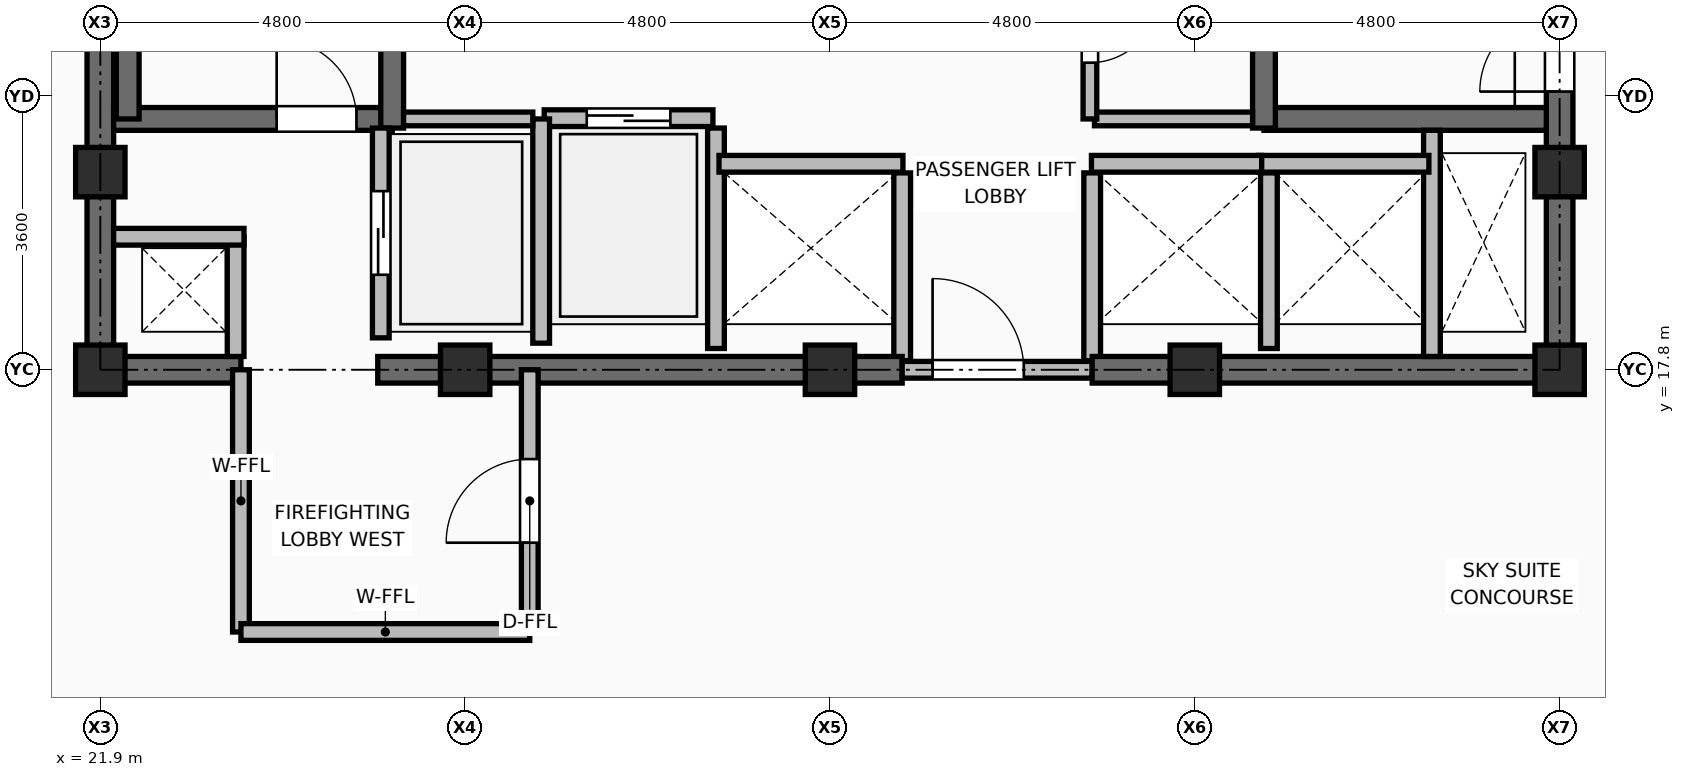
"""IFC4 building model, lengths in metres.
Left out: names, types, materials, properties, quantities, classifications, styles, units other than length and angle.
Written with IfcOpenShell. Run it as: python <this file> out.ifc"""

import sys

from ifc_helpers import new_model, si_unit, direction, frame, frame_2d, origin, origin_2d, place, context, subcontext, project, spatial, rectangle, extrude, element, fill, save


model = new_model("IFC4")
c1 = context("Model", 3, precision=1e-05, world=origin(), true_north=direction((0.0, 1.0)))
c2 = subcontext(c1, "Body", "Model", "MODEL_VIEW")
j1 = project(units=[si_unit("LENGTHUNIT", "METRE"), si_unit("PLANEANGLEUNIT", "RADIAN")], contexts=[c1])
p1 = place(None, origin())
s1 = spatial("IfcSite", under=j1, at=p1, CompositionType="ELEMENT")
p2 = place(p1, origin())
s2 = spatial("IfcBuilding", under=s1, at=p2, CompositionType="ELEMENT")
p3 = place(p2, frame((0.0, 0.0, 278.85)))
s3 = spatial("IfcBuildingStorey", under=s2, at=p3, CompositionType="ELEMENT", Elevation=278.85)
for number, where, z_axis, x_axis in (
    (1, (21.9, 17.8, 0.0), (0.0, 0.0, 1.0), (1.0, 0.0, 0.0)),
    (2, (26.7, 17.8, 0.0), (0.0, 0.0, 1.0), (1.0, 0.0, 0.0)),
    (3, (31.5, 17.8, 0.0), (0.0, 0.0, 1.0), (1.0, 0.0, 0.0)),
    (4, (36.3, 17.8, 0.0), (0.0, 0.0, 1.0), (1.0, 0.0, 0.0)),
    (5, (41.1, 17.8, 0.0), (0.0, 0.0, 1.0), (1.0, 0.0, 0.0)),
    (6, (21.9, 20.4, 0.0), (0.0, 0.0, 1.0), (1.0, 0.0, 0.0)),
    (7, (41.1, 20.4, 0.0), (0.0, 0.0, 1.0), (1.0, 0.0, 0.0)),
):
    element("IfcColumn", number, at=place(p3, frame(where, z_axis=z_axis, x_axis=x_axis)), inside=s3, PredefinedType="COLUMN", context=c2, shape_type="SweptSolid", body=[
        extrude(rectangle(XDim=0.65, YDim=0.65, at=origin_2d()), origin(), (0.0, 0.0, 1.0), 3.75),
    ])
p4 = place(p3, frame((30.0, 18.08, 0.0), z_axis=(0.0, 0.0, 1.0), x_axis=(0.0, 1.0, 0.0)))
e8 = element("IfcWall", 8, at=p4, inside=s3, PredefinedType="PARTITIONING", context=c2, shape_type="SweptSolid", body=[
    extrude(rectangle(XDim=2.9, YDim=0.22, at=frame_2d((1.45, 0.0))), origin(), (0.0, 0.0, 1.0), 3.545),
])
for number, where, z_axis, x_axis in (
    (9, (32.45, 17.92, 0.0), (0.0, 0.0, 1.0), (0.0, 1.0, 0.0)),
    (10, (34.95, 17.92, 0.0), (0.0, 0.0, 1.0), (0.0, 1.0, 0.0)),
):
    element("IfcWall", number, at=place(p3, frame(where, z_axis=z_axis, x_axis=x_axis)), inside=s3, PredefinedType="PARTITIONING", context=c2, shape_type="SweptSolid", body=[
        extrude(rectangle(XDim=2.47, YDim=0.22, at=frame_2d((1.235, 0.0))), origin(), (0.0, 0.0, 1.0), 3.545),
    ])
p5 = place(p3, frame((37.275, 18.08, 0.0), z_axis=(0.0, 0.0, 1.0), x_axis=(0.0, 1.0, 0.0)))
e11 = element("IfcWall", 11, at=p5, inside=s3, PredefinedType="PARTITIONING", context=c2, shape_type="SweptSolid", body=[
    extrude(rectangle(XDim=2.31, YDim=0.22, at=frame_2d((1.155, 0.0))), origin(), (0.0, 0.0, 1.0), 3.545),
])
p6 = place(p3, frame((21.725, 17.8, 0.0), z_axis=(0.0, 0.0, 1.0), x_axis=(1.0, 0.0, 0.0)))
e12 = element("IfcWall", 12, at=p6, inside=s3, PredefinedType="SHEAR", context=c2, shape_type="SweptSolid", body=[
    extrude(rectangle(XDim=2.025, YDim=0.35, at=frame_2d((1.012, 0.0))), origin(), (0.0, 0.0, 1.0), 3.57),
])
p7 = place(p3, frame((25.55, 17.8, 0.0), z_axis=(0.0, 0.0, 1.0), x_axis=(1.0, 0.0, 0.0)))
e13 = element("IfcWall", 13, at=p7, inside=s3, PredefinedType="SHEAR", context=c2, shape_type="SweptSolid", body=[
    extrude(rectangle(XDim=6.9, YDim=0.35, at=frame_2d((3.45, 0.0))), origin(), (0.0, 0.0, 1.0), 3.57),
])
p8 = place(p3, frame((32.45, 17.8, 0.0), z_axis=(0.0, 0.0, 1.0), x_axis=(1.0, 0.0, 0.0)))
e14 = element("IfcWall", 14, at=p8, inside=s3, PredefinedType="PARTITIONING", context=c2, shape_type="SweptSolid", body=[
    extrude(rectangle(XDim=2.5, YDim=0.22, at=frame_2d((1.25, 0.0))), origin(), (0.0, 0.0, 1.0), 3.132),
])
p9 = place(p8, frame((0.4, 0.0, 0.0)))
e15 = element("IfcOpeningElement", 15, at=p9, cuts=e14, PredefinedType="OPENING", context=c2, shape_type="SweptSolid", body=[
    extrude(rectangle(XDim=1.2, YDim=2.1, at=frame_2d((0.6, 1.05))), frame((0.0, 0.12, 0.0), z_axis=(0.0, -1.0, 0.0), x_axis=(1.0, 0.0, 0.0)), (0.0, 0.0, 1.0), 0.24),
])
p10 = place(p3, frame((34.95, 17.8, 0.0), z_axis=(0.0, 0.0, 1.0), x_axis=(1.0, 0.0, 0.0)))
e16 = element("IfcWall", 16, at=p10, inside=s3, PredefinedType="SHEAR", context=c2, shape_type="SweptSolid", body=[
    extrude(rectangle(XDim=6.325, YDim=0.35, at=frame_2d((3.163, 0.0))), origin(), (0.0, 0.0, 1.0), 3.57),
])
p11 = place(p3, frame((21.9, 17.975, 0.0), z_axis=(0.0, 0.0, 1.0), x_axis=(0.0, 1.0, 0.0)))
e17 = element("IfcWall", 17, at=p11, inside=s3, PredefinedType="SHEAR", context=c2, shape_type="SweptSolid", body=[
    extrude(rectangle(XDim=14.3, YDim=0.35, at=frame_2d((7.15, 0.0))), origin(), (0.0, 0.0, 1.0), 3.57),
])
p12 = place(p3, frame((41.1, 17.975, 0.0), z_axis=(0.0, 0.0, 1.0), x_axis=(0.0, 1.0, 0.0)))
e18 = element("IfcWall", 18, at=p12, inside=s3, PredefinedType="SHEAR", context=c2, shape_type="SweptSolid", body=[
    extrude(rectangle(XDim=14.3, YDim=0.35, at=frame_2d((7.15, 0.0))), origin(), (0.0, 0.0, 1.0), 3.57),
])
p13 = place(p12, frame((3.485, 0.0, 0.0)))
e19 = element("IfcOpeningElement", 19, at=p13, cuts=e18, PredefinedType="OPENING", context=c2, shape_type="SweptSolid", body=[
    extrude(rectangle(XDim=1.05, YDim=2.1, at=frame_2d((0.525, 1.05))), frame((0.0, 0.185, 0.0), z_axis=(0.0, -1.0, 0.0), x_axis=(1.0, 0.0, 0.0)), (0.0, 0.0, 1.0), 0.37),
])
p14 = place(p3, frame((22.075, 21.1, 0.0), z_axis=(0.0, 0.0, 1.0), x_axis=(1.0, 0.0, 0.0)))
e20 = element("IfcWall", 20, at=p14, inside=s3, PredefinedType="SHEAR", context=c2, shape_type="SweptSolid", body=[
    extrude(rectangle(XDim=3.665, YDim=0.3, at=frame_2d((1.833, 0.0))), origin(), (0.0, 0.0, 1.0), 3.57),
])
p15 = place(p14, frame((2.145, 0.0, 0.0)))
e21 = element("IfcOpeningElement", 21, at=p15, cuts=e20, PredefinedType="OPENING", context=c2, shape_type="SweptSolid", body=[
    extrude(rectangle(XDim=1.05, YDim=2.1, at=frame_2d((0.525, 1.05))), frame((0.0, 0.16, 0.0), z_axis=(0.0, -1.0, 0.0), x_axis=(1.0, 0.0, 0.0)), (0.0, 0.0, 1.0), 0.32),
])
p16 = place(p3, frame((25.74, 20.98, 0.0), z_axis=(0.0, 0.0, 1.0), x_axis=(0.0, 1.0, 0.0)))
e22 = element("IfcWall", 22, at=p16, inside=s3, PredefinedType="SHEAR", context=c2, shape_type="SweptSolid", body=[
    extrude(rectangle(XDim=7.99, YDim=0.3, at=frame_2d((3.995, 0.0))), origin(), (0.0, 0.0, 1.0), 3.57),
])
p17 = place(p3, frame((22.26, 21.1, 0.0), z_axis=(0.0, 0.0, 1.0), x_axis=(0.0, 1.0, 0.0)))
e23 = element("IfcWall", 23, at=p17, inside=s3, PredefinedType="SHEAR", context=c2, shape_type="SweptSolid", body=[
    extrude(rectangle(XDim=7.75, YDim=0.3, at=frame_2d((3.875, 0.0))), origin(), (0.0, 0.0, 1.0), 3.57),
])
p18 = place(p3, frame((37.21, 21.1, 0.0), z_axis=(0.0, 0.0, 1.0), x_axis=(1.0, 0.0, 0.0)))
e24 = element("IfcWall", 24, at=p18, inside=s3, PredefinedType="SHEAR", context=c2, shape_type="SweptSolid", body=[
    extrude(rectangle(XDim=3.715, YDim=0.3, at=frame_2d((1.857, 0.0))), origin(), (0.0, 0.0, 1.0), 3.57),
])
p19 = place(p3, frame((37.21, 20.98, 0.0), z_axis=(0.0, 0.0, 1.0), x_axis=(0.0, 1.0, 0.0)))
e25 = element("IfcWall", 25, at=p19, inside=s3, PredefinedType="SHEAR", context=c2, shape_type="SweptSolid", body=[
    extrude(rectangle(XDim=7.99, YDim=0.3, at=frame_2d((3.995, 0.0))), origin(), (0.0, 0.0, 1.0), 3.57),
])
p20 = place(p3, frame((23.68, 17.975, 0.0), z_axis=(0.0, 0.0, 1.0), x_axis=(0.0, 1.0, 0.0)))
e26 = element("IfcWall", 26, at=p20, inside=s3, PredefinedType="PARTITIONING", context=c2, shape_type="SweptSolid", body=[
    extrude(rectangle(XDim=1.575, YDim=0.22, at=frame_2d((0.788, 0.0))), origin(), (0.0, 0.0, 1.0), 3.132),
])
p21 = place(p3, frame((22.075, 19.55, 0.0), z_axis=(0.0, 0.0, 1.0), x_axis=(1.0, 0.0, 0.0)))
e27 = element("IfcWall", 27, at=p21, inside=s3, PredefinedType="PARTITIONING", context=c2, shape_type="SweptSolid", body=[
    extrude(rectangle(XDim=1.715, YDim=0.22, at=frame_2d((0.857, 0.0))), origin(), (0.0, 0.0, 1.0), 2.595),
])
p22 = place(p3, frame((39.42, 17.975, 0.0), z_axis=(0.0, 0.0, 1.0), x_axis=(0.0, 1.0, 0.0)))
e28 = element("IfcWall", 28, at=p22, inside=s3, PredefinedType="PARTITIONING", context=c2, shape_type="SweptSolid", body=[
    extrude(rectangle(XDim=2.975, YDim=0.22, at=frame_2d((1.487, 0.0))), origin(), (0.0, 0.0, 1.0), 3.132),
])
p23 = place(p3, frame((25.59, 18.22, 0.0), z_axis=(0.0, 0.0, 1.0), x_axis=(0.0, 1.0, 0.0)))
e29 = element("IfcWall", 29, at=p23, inside=s3, PredefinedType="PARTITIONING", context=c2, shape_type="SweptSolid", body=[
    extrude(rectangle(XDim=2.76, YDim=0.22, at=frame_2d((1.38, 0.0))), origin(), (0.0, 0.0, 1.0), 3.55),
])
p24 = place(p23, frame((0.83, 0.0, 0.0)))
e30 = element("IfcOpeningElement", 30, at=p24, cuts=e29, PredefinedType="OPENING", context=c2, shape_type="SweptSolid", body=[
    extrude(rectangle(XDim=1.1, YDim=2.2, at=frame_2d((0.55, 1.1))), frame((0.0, 0.12, 0.0), z_axis=(0.0, -1.0, 0.0), x_axis=(1.0, 0.0, 0.0)), (0.0, 0.0, 1.0), 0.24),
])
p25 = place(p3, frame((27.74, 21.11, 0.0), z_axis=(0.0, 0.0, 1.0), x_axis=(1.0, 0.0, 0.0)))
e31 = element("IfcWall", 31, at=p25, inside=s3, PredefinedType="PARTITIONING", context=c2, shape_type="SweptSolid", body=[
    extrude(rectangle(XDim=2.22, YDim=0.22, at=frame_2d((1.11, 0.0))), origin(), (0.0, 0.0, 1.0), 3.55),
])
p26 = place(p25, frame((0.56, 0.0, 0.0)))
e32 = element("IfcOpeningElement", 32, at=p26, cuts=e31, PredefinedType="OPENING", context=c2, shape_type="SweptSolid", body=[
    extrude(rectangle(XDim=1.1, YDim=2.2, at=frame_2d((0.55, 1.1))), frame((0.0, 0.12, 0.0), z_axis=(0.0, -1.0, 0.0), x_axis=(1.0, 0.0, 0.0)), (0.0, 0.0, 1.0), 0.24),
])
p27 = place(p3, frame((30.04, 20.51, 0.0), z_axis=(0.0, 0.0, 1.0), x_axis=(1.0, 0.0, 0.0)))
e33 = element("IfcWall", 33, at=p27, inside=s3, PredefinedType="PARTITIONING", context=c2, shape_type="SweptSolid", body=[
    extrude(rectangle(XDim=2.42, YDim=0.22, at=frame_2d((1.21, 0.0))), origin(), (0.0, 0.0, 1.0), 3.55),
])
for number, where, z_axis, x_axis in (
    (34, (37.14, 20.51, 0.0), (0.0, 0.0, 1.0), (1.0, 0.0, 0.0)),
    (35, (34.94, 20.51, 0.0), (0.0, 0.0, 1.0), (1.0, 0.0, 0.0)),
):
    element("IfcWall", number, at=place(p3, frame(where, z_axis=z_axis, x_axis=x_axis)), inside=s3, PredefinedType="PARTITIONING", context=c2, shape_type="SweptSolid", body=[
        extrude(rectangle(XDim=2.24, YDim=0.22, at=frame_2d((1.12, 0.0))), origin(), (0.0, 0.0, 1.0), 3.55),
    ])
p28 = place(p3, frame((27.7, 18.15, 0.0), z_axis=(0.0, 0.0, 1.0), x_axis=(0.0, 1.0, 0.0)))
e36 = element("IfcWall", 36, at=p28, inside=s3, PredefinedType="PARTITIONING", context=c2, shape_type="SweptSolid", body=[
    extrude(rectangle(XDim=2.95, YDim=0.22, at=frame_2d((1.475, 0.0))), origin(), (0.0, 0.0, 1.0), 3.55),
])
p29 = place(p3, frame((25.89, 21.1, 0.0), z_axis=(0.0, 0.0, 1.0), x_axis=(1.0, 0.0, 0.0)))
e37 = element("IfcWall", 37, at=p29, inside=s3, PredefinedType="PARTITIONING", context=c2, shape_type="SweptSolid", body=[
    extrude(rectangle(XDim=1.7, YDim=0.18, at=frame_2d((0.85, 0.0))), origin(), (0.0, 0.0, 1.0), 3.55),
])
p30 = place(p3, frame((34.98, 21.1, 0.0), z_axis=(0.0, 0.0, 1.0), x_axis=(1.0, 0.0, 0.0)))
e38 = element("IfcWall", 38, at=p30, inside=s3, PredefinedType="PARTITIONING", context=c2, shape_type="SweptSolid", body=[
    extrude(rectangle(XDim=2.08, YDim=0.18, at=frame_2d((1.04, 0.0))), origin(), (0.0, 0.0, 1.0), 3.55),
])
p31 = place(p3, frame((34.92, 21.1, 0.0), z_axis=(0.0, 0.0, 1.0), x_axis=(0.0, 1.0, 0.0)))
e39 = element("IfcWall", 39, at=p31, inside=s3, PredefinedType="PARTITIONING", context=c2, shape_type="SweptSolid", body=[
    extrude(rectangle(XDim=2.38, YDim=0.18, at=frame_2d((1.19, 0.0))), origin(), (0.0, 0.0, 1.0), 3.55),
])
p32 = place(p31, frame((0.74, 0.0, 0.0)))
e40 = element("IfcOpeningElement", 40, at=p32, cuts=e39, PredefinedType="OPENING", context=c2, shape_type="SweptSolid", body=[
    extrude(rectangle(XDim=0.9, YDim=2.1, at=frame_2d((0.45, 1.05))), frame((0.0, 0.1, 0.0), z_axis=(0.0, -1.0, 0.0), x_axis=(1.0, 0.0, 0.0)), (0.0, 0.0, 1.0), 0.2),
])
p33 = place(p3, frame((23.75, 14.35, 0.0), z_axis=(0.0, 0.0, 1.0), x_axis=(0.0, 1.0, 0.0)))
e41 = element("IfcWall", 41, at=p33, inside=s3, PredefinedType="PARTITIONING", context=c2, shape_type="SweptSolid", body=[
    extrude(rectangle(XDim=3.45, YDim=0.22, at=frame_2d((1.725, 0.0))), origin(), (0.0, 0.0, 1.0), 3.132),
])
p34 = place(p3, frame((23.75, 14.35, 0.0), z_axis=(0.0, 0.0, 1.0), x_axis=(1.0, 0.0, 0.0)))
e42 = element("IfcWall", 42, at=p34, inside=s3, PredefinedType="PARTITIONING", context=c2, shape_type="SweptSolid", body=[
    extrude(rectangle(XDim=3.8, YDim=0.22, at=frame_2d((1.9, 0.0))), origin(), (0.0, 0.0, 1.0), 3.55),
])
p35 = place(p3, frame((27.55, 14.35, 0.0), z_axis=(0.0, 0.0, 1.0), x_axis=(0.0, 1.0, 0.0)))
e43 = element("IfcWall", 43, at=p35, inside=s3, PredefinedType="PARTITIONING", context=c2, shape_type="SweptSolid", body=[
    extrude(rectangle(XDim=3.45, YDim=0.22, at=frame_2d((1.725, 0.0))), origin(), (0.0, 0.0, 1.0), 3.132),
])
p36 = place(p35, frame((1.175, 0.0, 0.0)))
e44 = element("IfcOpeningElement", 44, at=p36, cuts=e43, PredefinedType="OPENING", context=c2, shape_type="SweptSolid", body=[
    extrude(rectangle(XDim=1.1, YDim=2.1, at=frame_2d((0.55, 1.05))), frame((0.0, 0.12, 0.0), z_axis=(0.0, -1.0, 0.0), x_axis=(1.0, 0.0, 0.0)), (0.0, 0.0, 1.0), 0.24),
])
p37 = place(p9, origin())
e45 = element("IfcDoor", 45, at=p37, inside=s3, OperationType="SINGLE_SWING_LEFT", PredefinedType="DOOR", context=c2, shape_type="SweptSolid", body=[
    extrude(rectangle(XDim=1.2, YDim=2.1, at=frame_2d((0.6, 1.05))), frame((0.0, 0.025, 0.0), z_axis=(0.0, -1.0, 0.0), x_axis=(1.0, 0.0, 0.0)), (0.0, 0.0, 1.0), 0.05),
])
fill(e15, e45)
p38 = place(p15, origin())
e46 = element("IfcDoor", 46, at=p38, inside=s3, OperationType="SINGLE_SWING_LEFT", PredefinedType="DOOR", context=c2, shape_type="SweptSolid", body=[
    extrude(rectangle(XDim=1.05, YDim=2.1, at=frame_2d((0.525, 1.05))), frame((0.0, 0.025, 0.0), z_axis=(0.0, -1.0, 0.0), x_axis=(1.0, 0.0, 0.0)), (0.0, 0.0, 1.0), 0.05),
])
fill(e21, e46)
p39 = place(p13, origin())
e47 = element("IfcDoor", 47, at=p39, inside=s3, OperationType="SINGLE_SWING_LEFT", PredefinedType="DOOR", context=c2, shape_type="SweptSolid", body=[
    extrude(rectangle(XDim=1.05, YDim=2.1, at=frame_2d((0.525, 1.05))), frame((0.0, 0.025, 0.0), z_axis=(0.0, -1.0, 0.0), x_axis=(1.0, 0.0, 0.0)), (0.0, 0.0, 1.0), 0.05),
])
fill(e19, e47)
p40 = place(p24, origin())
e48 = element("IfcDoor", 48, at=p40, inside=s3, OperationType="DOUBLE_DOOR_SLIDING", PredefinedType="DOOR", context=c2, shape_type="SweptSolid", body=[
    extrude(rectangle(XDim=1.1, YDim=2.2, at=frame_2d((0.55, 1.1))), frame((0.0, 0.025, 0.0), z_axis=(0.0, -1.0, 0.0), x_axis=(1.0, 0.0, 0.0)), (0.0, 0.0, 1.0), 0.05),
])
fill(e30, e48)
p41 = place(p26, origin())
e49 = element("IfcDoor", 49, at=p41, inside=s3, OperationType="DOUBLE_DOOR_SLIDING", PredefinedType="DOOR", context=c2, shape_type="SweptSolid", body=[
    extrude(rectangle(XDim=1.1, YDim=2.2, at=frame_2d((0.55, 1.1))), frame((0.0, 0.025, 0.0), z_axis=(0.0, -1.0, 0.0), x_axis=(1.0, 0.0, 0.0)), (0.0, 0.0, 1.0), 0.05),
])
fill(e32, e49)
p42 = place(p32, frame((0.9, 0.0, 0.0), z_axis=(0.0, 0.0, 1.0), x_axis=(-1.0, 0.0, 0.0)))
e50 = element("IfcDoor", 50, at=p42, inside=s3, OperationType="SINGLE_SWING_LEFT", PredefinedType="DOOR", context=c2, shape_type="SweptSolid", body=[
    extrude(rectangle(XDim=0.9, YDim=2.1, at=frame_2d((0.45, 1.05))), frame((0.0, 0.025, 0.0), z_axis=(0.0, -1.0, 0.0), x_axis=(1.0, 0.0, 0.0)), (0.0, 0.0, 1.0), 0.05),
])
fill(e40, e50)
p43 = place(p36, origin())
e51 = element("IfcDoor", 51, at=p43, inside=s3, OperationType="SINGLE_SWING_LEFT", PredefinedType="DOOR", context=c2, shape_type="SweptSolid", body=[
    extrude(rectangle(XDim=1.1, YDim=2.1, at=frame_2d((0.55, 1.05))), frame((0.0, 0.025, 0.0), z_axis=(0.0, -1.0, 0.0), x_axis=(1.0, 0.0, 0.0)), (0.0, 0.0, 1.0), 0.05),
])
fill(e44, e51)
save(model, sys.argv[1])
